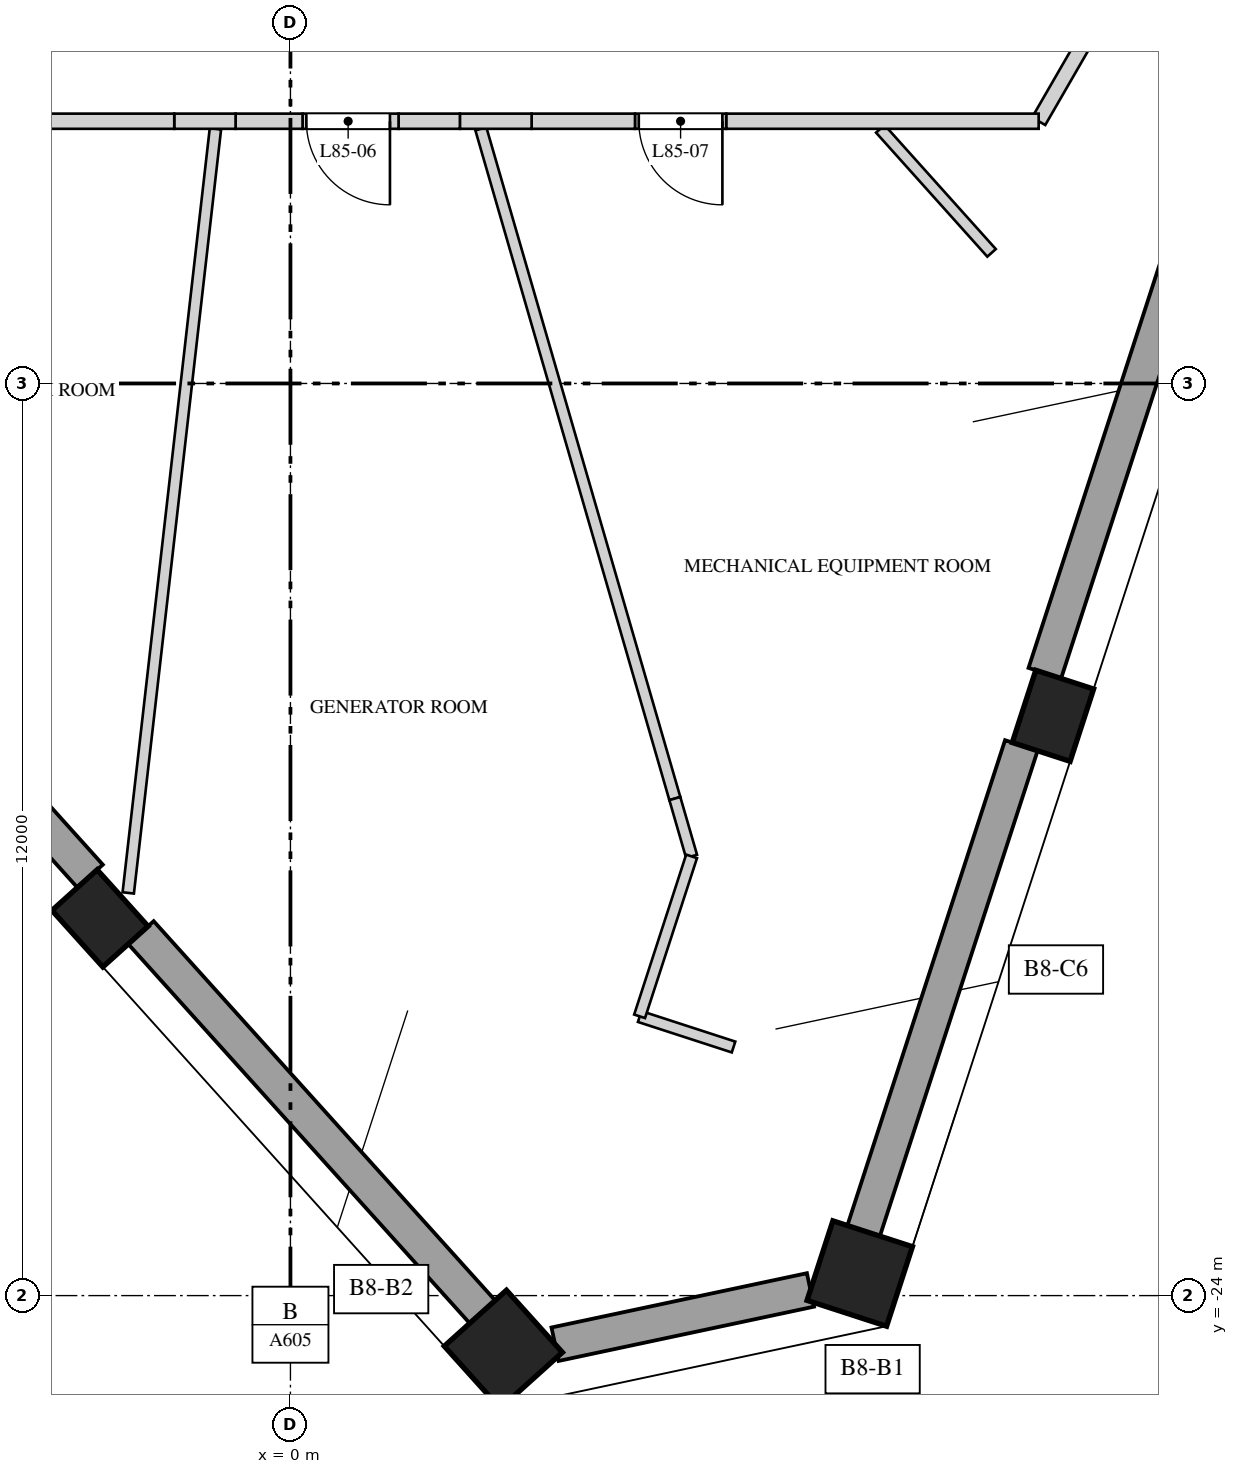
"""IFC4 building model, lengths in metres.
Left out: names, types, materials, properties, quantities, classifications, styles, units other than length and angle.
Written with IfcOpenShell. Run it as: python <this file> out.ifc"""

import sys

from ifc_helpers import new_model, si_unit, direction, frame, frame_2d, origin, origin_2d, place, context, subcontext, project, spatial, polyline, rectangle, outline, extrude, element, fill, save


model = new_model("IFC4")
c1 = context("Model", 3, precision=1e-05, world=origin(), true_north=direction((0.0, 1.0)))
c2 = subcontext(c1, "Body", "Model", "MODEL_VIEW")
j1 = project(units=[si_unit("LENGTHUNIT", "METRE"), si_unit("PLANEANGLEUNIT", "RADIAN")], contexts=[c1])
p1 = place(None, origin())
s1 = spatial("IfcSite", under=j1, at=p1, CompositionType="ELEMENT")
p2 = place(p1, origin())
s2 = spatial("IfcBuilding", under=s1, at=p2, CompositionType="ELEMENT")
p3 = place(p2, frame((0.0, 0.0, 370.4)))
s3 = spatial("IfcBuildingStorey", under=s2, at=p3, CompositionType="ELEMENT", Elevation=370.4)
p4 = place(p3, frame((-2.505, -19.037, 0.0), z_axis=(0.0, 0.0, 1.0), x_axis=(0.669130606359, -0.743144825477, 0.0)))
e1 = element("IfcColumn", 1, at=p4, inside=s3, PredefinedType="COLUMN", context=c2, shape_type="SweptSolid", body=[
    extrude(rectangle(XDim=1.0, YDim=0.8, at=origin_2d()), origin(), (0.0, 0.0, 1.0), 4.5),
])
for number, where, z_axis, x_axis in (
    (2, (2.801, -24.706, 0.0), (0.0, 0.0, 1.0), (0.669, -0.743, 0.0)),
    (3, (7.49, -23.709, 0.0), (0.0, 0.0, 1.0), (0.309, 0.951, 0.0)),
):
    element("IfcColumn", number, at=place(p3, frame(where, z_axis=z_axis, x_axis=x_axis)), inside=s3, PredefinedType="COLUMN", context=c2, shape_type="SweptSolid", body=[
        extrude(rectangle(XDim=1.1, YDim=1.1, at=origin_2d()), origin(), (0.0, 0.0, 1.0), 4.5),
    ])
p5 = place(p3, frame((10.032, -16.372, 0.0), z_axis=(0.0, 0.0, 1.0), x_axis=(0.309016994375, 0.951056516295, 0.0)))
e4 = element("IfcColumn", 4, at=p5, inside=s3, PredefinedType="COLUMN", context=c2, shape_type="SweptSolid", body=[
    extrude(rectangle(XDim=1.0, YDim=0.8, at=origin_2d()), origin(), (0.0, 0.0, 1.0), 4.5),
])
p6 = place(p3, frame((-7.53, -13.046, 0.0), z_axis=(0.0, 0.0, 1.0), x_axis=(0.669152823362, -0.743124820597, 0.0)))
e5 = element("IfcWall", 5, at=p6, inside=s3, PredefinedType="SOLIDWALL", context=c2, shape_type="SweptSolid", body=[
    extrude(rectangle(XDim=7.314, YDim=0.45, at=frame_2d((3.657, 0.0))), origin(), (0.0, 0.0, 1.0), 3.8),
])
p7 = place(p3, frame((-1.966, -19.224, 0.0), z_axis=(0.0, 0.0, 1.0), x_axis=(0.66911941145, -0.743154905266, 0.0)))
e6 = element("IfcWall", 6, at=p7, inside=s3, PredefinedType="SOLIDWALL", context=c2, shape_type="SweptSolid", body=[
    extrude(rectangle(XDim=6.714, YDim=0.45, at=frame_2d((3.357, 0.0))), origin(), (0.0, 0.0, 1.0), 3.8),
])
p8 = place(p3, frame((3.481, -24.64, 0.0), z_axis=(0.0, 0.0, 1.0), x_axis=(0.978139158523, 0.207951404333, 0.0)))
e7 = element("IfcWall", 7, at=p8, inside=s3, PredefinedType="SOLIDWALL", context=c2, shape_type="SweptSolid", body=[
    extrude(rectangle(XDim=3.435, YDim=0.45, at=frame_2d((1.718, 0.0))), origin(), (0.0, 0.0, 1.0), 3.8),
])
p9 = place(p3, frame((7.541, -23.148, 0.0), z_axis=(0.0, 0.0, 1.0), x_axis=(0.309018647645, 0.951055979114, 0.0)))
e8 = element("IfcWall", 8, at=p9, inside=s3, PredefinedType="SOLIDWALL", context=c2, shape_type="SweptSolid", body=[
    extrude(rectangle(XDim=6.714, YDim=0.45, at=frame_2d((3.357, 0.0))), origin(), (0.0, 0.0, 1.0), 3.8),
])
p10 = place(p3, frame((9.925, -15.812, 0.0), z_axis=(0.0, 0.0, 1.0), x_axis=(0.309008326872, 0.951059332494, 0.0)))
e9 = element("IfcWall", 9, at=p10, inside=s3, PredefinedType="SOLIDWALL", context=c2, shape_type="SweptSolid", body=[
    extrude(rectangle(XDim=7.314, YDim=0.45, at=frame_2d((3.657, 0.0))), origin(), (0.0, 0.0, 1.0), 3.8),
])
p11 = place(p3, frame((-0.987, -8.65, 0.0), z_axis=(0.0, 0.0, 1.0), x_axis=(-0.113368279169, -0.99355303496, 0.0)))
e10 = element("IfcWall", 10, at=p11, inside=s3, PredefinedType="PARTITIONING", context=c2, shape_type="SweptSolid", body=[
    extrude(rectangle(XDim=10.117, YDim=0.15, at=frame_2d((5.059, 0.0))), origin(), (0.0, 0.0, 1.0), 3.25),
])
p12 = place(p3, frame((2.505, -8.65, 0.0), z_axis=(0.0, 0.0, 1.0), x_axis=(0.278185386407, -0.960527402415, 0.0)))
e11 = element("IfcWall", 11, at=p12, inside=s3, PredefinedType="PARTITIONING", context=c2, shape_type="SweptSolid", body=[
    extrude(rectangle(XDim=9.173, YDim=0.15, at=frame_2d((4.586, 0.0))), origin(), (0.0, 0.0, 1.0), 3.05),
])
p13 = place(p3, frame((5.057, -17.461, 0.0), z_axis=(0.0, 0.0, 1.0), x_axis=(0.278222842465, -0.960516553699, 0.0)))
e12 = element("IfcWall", 12, at=p13, inside=s3, PredefinedType="PARTITIONING", context=c2, shape_type="SweptSolid", body=[
    extrude(rectangle(XDim=0.792, YDim=0.15, at=frame_2d((0.396, 0.0))), origin(), (0.0, 0.0, 1.0), 4.15),
])
p14 = place(p3, frame((4.595, -20.328, 0.0), z_axis=(0.0, 0.0, 1.0), x_axis=(0.951063088132, -0.308996767609, 0.0)))
e13 = element("IfcWall", 13, at=p14, inside=s3, PredefinedType="PARTITIONING", context=c2, shape_type="SweptSolid", body=[
    extrude(rectangle(XDim=1.298, YDim=0.15, at=frame_2d((0.649, 0.0))), origin(), (0.0, 0.0, 1.0), 4.15),
])
p15 = place(p3, frame((5.277, -18.221, 0.0), z_axis=(0.0, 0.0, 1.0), x_axis=(-0.309036176758, -0.951050283347, 0.0)))
e14 = element("IfcWall", 14, at=p15, inside=s3, PredefinedType="PARTITIONING", context=c2, shape_type="SweptSolid", body=[
    extrude(rectangle(XDim=2.213, YDim=0.15, at=frame_2d((1.106, 0.0))), origin(), (0.0, 0.0, 1.0), 4.15),
])
p16 = place(p3, frame((7.76, -8.65, 0.0), z_axis=(0.0, 0.0, 1.0), x_axis=(0.667813245051, -0.744328872028, 0.0)))
e15 = element("IfcWall", 15, at=p16, inside=s3, PredefinedType="PARTITIONING", context=c2, shape_type="SweptSolid", body=[
    extrude(rectangle(XDim=2.192, YDim=0.15, at=frame_2d((1.096, 0.0))), origin(), (0.0, 0.0, 1.0), 4.15),
])
p17 = place(p3, frame((10.474, -7.458, 0.0), z_axis=(0.0, 0.0, 1.0), x_axis=(-0.499929168788, -0.866066294342, 0.0)))
e16 = element("IfcWall", 16, at=p17, inside=s3, PredefinedType="SOLIDWALL", context=c2, shape_type="SweptSolid", body=[
    extrude(rectangle(XDim=1.261, YDim=0.2, at=frame_2d((0.63, 0.0))), origin(), (0.0, 0.0, 1.0), 4.15),
])
p18 = place(p3, frame((9.844, -8.55, 0.0), z_axis=(0.0, 0.0, 1.0), x_axis=(-1.0, 0.0, 0.0)))
e17 = element("IfcWall", 17, at=p18, inside=s3, PredefinedType="SOLIDWALL", context=c2, shape_type="SweptSolid", body=[
    extrude(rectangle(XDim=4.111, YDim=0.2, at=frame_2d((2.055, 0.0))), origin(), (0.0, 0.0, 1.0), 4.15),
])
p19 = place(p3, frame((5.733, -8.55, 0.0), z_axis=(0.0, 0.0, 1.0), x_axis=(-1.0, 0.0, 0.0)))
e18 = element("IfcWall", 18, at=p19, inside=s3, PredefinedType="SOLIDWALL", context=c2, shape_type="SweptSolid", body=[
    extrude(outline(polyline([(0.0, 0.0), (1.2, 0.0), (1.2, 4.15), (0.905, 4.15), (0.905, 3.45), (0.0, 3.45), (0.0, 0.0)])), frame((0.0, 0.1, 0.0), z_axis=(0.0, -1.0, 0.0), x_axis=(1.0, 0.0, 0.0)), (0.0, 0.0, 1.0), 0.2),
])
p20 = place(p19, frame((0.05, 0.0, 0.0)))
e19 = element("IfcOpeningElement", 19, at=p20, cuts=e18, PredefinedType="OPENING", context=c2, shape_type="SweptSolid", body=[
    extrude(rectangle(XDim=1.1, YDim=2.4, at=frame_2d((0.55, 1.2))), frame((0.0, 0.11, 0.0), z_axis=(0.0, -1.0, 0.0), x_axis=(1.0, 0.0, 0.0)), (0.0, 0.0, 1.0), 0.22),
])
p21 = place(p3, frame((4.533, -8.55, 0.0), z_axis=(0.0, 0.0, 1.0), x_axis=(-1.0, 0.0, 0.0)))
e20 = element("IfcWall", 20, at=p21, inside=s3, PredefinedType="SOLIDWALL", context=c2, shape_type="SweptSolid", body=[
    extrude(rectangle(XDim=1.36, YDim=0.2, at=frame_2d((0.68, 0.0))), origin(), (0.0, 0.0, 1.0), 4.15),
])
p22 = place(p3, frame((3.173, -8.55, 0.0), z_axis=(0.0, 0.0, 1.0), x_axis=(-1.0, 0.0, 0.0)))
e21 = element("IfcWall", 21, at=p22, inside=s3, PredefinedType="SOLIDWALL", context=c2, shape_type="SweptSolid", body=[
    extrude(rectangle(XDim=0.944, YDim=0.2, at=frame_2d((0.472, 0.0))), origin(), (0.0, 0.0, 1.0), 3.05),
])
p23 = place(p3, frame((2.229, -8.55, 0.0), z_axis=(0.0, 0.0, 1.0), x_axis=(-1.0, 0.0, 0.0)))
e22 = element("IfcWall", 22, at=p23, inside=s3, PredefinedType="SOLIDWALL", context=c2, shape_type="SweptSolid", body=[
    extrude(rectangle(XDim=0.807, YDim=0.2, at=frame_2d((0.403, 0.0))), origin(), (0.0, 0.0, 1.0), 4.15),
])
p24 = place(p3, frame((1.422, -8.55, 0.0), z_axis=(0.0, 0.0, 1.0), x_axis=(-1.0, 0.0, 0.0)))
e23 = element("IfcWall", 23, at=p24, inside=s3, PredefinedType="SOLIDWALL", context=c2, shape_type="SweptSolid", body=[
    extrude(outline(polyline([(0.0, 0.0), (1.263, 0.0), (1.263, 4.15), (0.906, 4.15), (0.906, 3.05), (0.0, 3.05), (0.0, 0.0)])), frame((0.0, 0.1, 0.0), z_axis=(0.0, -1.0, 0.0), x_axis=(1.0, 0.0, 0.0)), (0.0, 0.0, 1.0), 0.2),
])
p25 = place(p24, frame((0.113, 0.0, 0.0)))
e24 = element("IfcOpeningElement", 24, at=p25, cuts=e23, PredefinedType="OPENING", context=c2, shape_type="SweptSolid", body=[
    extrude(rectangle(XDim=1.1, YDim=2.4, at=frame_2d((0.55, 1.2))), frame((0.0, 0.11, 0.0), z_axis=(0.0, -1.0, 0.0), x_axis=(1.0, 0.0, 0.0)), (0.0, 0.0, 1.0), 0.22),
])
p26 = place(p3, frame((0.159, -8.55, 0.0), z_axis=(0.0, 0.0, 1.0), x_axis=(-1.0, 0.0, 0.0)))
e25 = element("IfcWall", 25, at=p26, inside=s3, PredefinedType="SOLIDWALL", context=c2, shape_type="SweptSolid", body=[
    extrude(rectangle(XDim=0.881, YDim=0.2, at=frame_2d((0.44, 0.0))), origin(), (0.0, 0.0, 1.0), 4.15),
])
p27 = place(p3, frame((-0.722, -8.55, 0.0), z_axis=(0.0, 0.0, 1.0), x_axis=(-1.0, 0.0, 0.0)))
e26 = element("IfcWall", 26, at=p27, inside=s3, PredefinedType="SOLIDWALL", context=c2, shape_type="SweptSolid", body=[
    extrude(rectangle(XDim=0.807, YDim=0.2, at=frame_2d((0.403, 0.0))), origin(), (0.0, 0.0, 1.0), 3.25),
])
p28 = place(p3, frame((-1.529, -8.55, 0.0), z_axis=(0.0, 0.0, 1.0), x_axis=(-1.0, 0.0, 0.0)))
e27 = element("IfcWall", 27, at=p28, inside=s3, PredefinedType="SOLIDWALL", context=c2, shape_type="SweptSolid", body=[
    extrude(rectangle(XDim=3.206, YDim=0.2, at=frame_2d((1.603, 0.0))), origin(), (0.0, 0.0, 1.0), 4.15),
])
p29 = place(p25, origin())
e28 = element("IfcDoor", 28, at=p29, inside=s3, OperationType="SINGLE_SWING_RIGHT", PredefinedType="DOOR", context=c2, shape_type="SweptSolid", body=[
    extrude(rectangle(XDim=1.1, YDim=2.4, at=frame_2d((0.55, 1.2))), frame((0.0, 0.025, 0.0), z_axis=(0.0, -1.0, 0.0), x_axis=(1.0, 0.0, 0.0)), (0.0, 0.0, 1.0), 0.05),
])
fill(e24, e28)
p30 = place(p20, origin())
e29 = element("IfcDoor", 29, at=p30, inside=s3, OperationType="SINGLE_SWING_LEFT", PredefinedType="DOOR", context=c2, shape_type="SweptSolid", body=[
    extrude(rectangle(XDim=1.1, YDim=2.4, at=frame_2d((0.55, 1.2))), frame((0.0, 0.025, 0.0), z_axis=(0.0, -1.0, 0.0), x_axis=(1.0, 0.0, 0.0)), (0.0, 0.0, 1.0), 0.05),
])
fill(e19, e29)
save(model, sys.argv[1])
